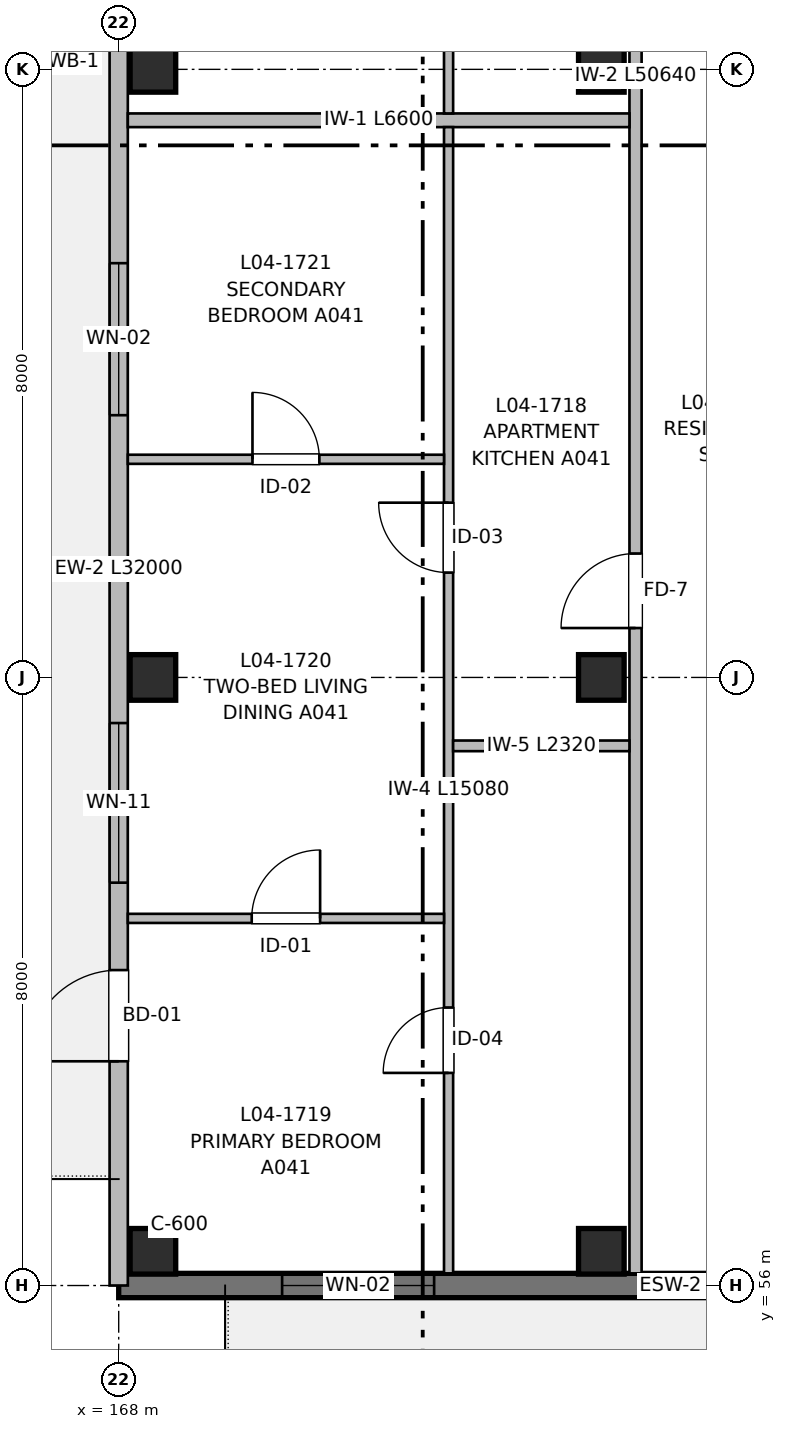
"""IFC4 building model, lengths in metres.
Left out: names, types, materials, properties, quantities, classifications, styles, units other than length and angle.
Written with IfcOpenShell. Run it as: python <this file> out.ifc"""

import sys

from ifc_helpers import new_model, si_unit, direction, frame, frame_2d, origin, origin_2d, place, context, subcontext, project, spatial, rectangle, extrude, element, fill, save


model = new_model("IFC4")
c1 = context("Model", 3, precision=1e-05, world=origin(), true_north=direction((0.0, 1.0)))
c2 = subcontext(c1, "Body", "Model", "MODEL_VIEW")
j1 = project(units=[si_unit("LENGTHUNIT", "METRE"), si_unit("PLANEANGLEUNIT", "RADIAN")], contexts=[c1])
p1 = place(None, origin())
s1 = spatial("IfcSite", under=j1, at=p1, CompositionType="ELEMENT")
p2 = place(p1, origin())
s2 = spatial("IfcBuilding", under=s1, at=p2, CompositionType="ELEMENT")
p3 = place(p2, frame((0.0, 0.0, 13.76)))
s3 = spatial("IfcBuildingStorey", under=s2, at=p3, CompositionType="ELEMENT", Elevation=13.76)
for number, where, z_axis, x_axis in (
    (1, (168.45, 56.45, 0.0), (0.0, 0.0, 1.0), (1.0, 0.0, 0.0)),
    (2, (168.45, 64.0, 0.0), (0.0, 0.0, 1.0), (1.0, 0.0, 0.0)),
    (3, (168.45, 72.0, 0.0), (0.0, 0.0, 1.0), (1.0, 0.0, 0.0)),
    (4, (174.35, 56.45, 0.0), (0.0, 0.0, 1.0), (1.0, 0.0, 0.0)),
    (5, (174.35, 64.0, 0.0), (0.0, 0.0, 1.0), (1.0, 0.0, 0.0)),
    (6, (174.35, 72.0, 0.0), (0.0, 0.0, 1.0), (1.0, 0.0, 0.0)),
):
    element("IfcColumn", number, at=place(p3, frame(where, z_axis=z_axis, x_axis=x_axis)), inside=s3, PredefinedType="COLUMN", context=c2, shape_type="SweptSolid", body=[
        extrude(rectangle(XDim=0.6, YDim=0.6, at=origin_2d()), origin(), (0.0, 0.0, 1.0), 3.2),
    ])
p4 = place(p3, frame((184.0, 56.0, 0.0), z_axis=(0.0, 0.0, 1.0), x_axis=(-1.0, 0.0, 0.0)))
e7 = element("IfcWall", 7, at=p4, inside=s3, PredefinedType="SHEAR", context=c2, shape_type="SweptSolid", body=[
    extrude(rectangle(XDim=16.0, YDim=0.32, at=frame_2d((8.0, 0.0))), origin(), (0.0, 0.0, 1.0), 2.98),
])
p5 = place(p4, frame((3.4, 0.0, 0.0)))
e8 = element("IfcOpeningElement", 8, at=p5, cuts=e7, PredefinedType="OPENING", context=c2, shape_type="SweptSolid", body=[
    extrude(rectangle(XDim=1.2, YDim=2.2, at=frame_2d((0.6, 1.1))), frame((0.0, 0.17, 0.0), z_axis=(0.0, -1.0, 0.0), x_axis=(1.0, 0.0, 0.0)), (0.0, 0.0, 1.0), 0.34),
])
p6 = place(p4, frame((11.85, 0.0, 0.72)))
e9 = element("IfcOpeningElement", 9, at=p6, cuts=e7, PredefinedType="OPENING", context=c2, shape_type="SweptSolid", body=[
    extrude(rectangle(XDim=2.0, YDim=1.5, at=frame_2d((1.0, 0.75))), frame((0.0, 0.17, 0.0), z_axis=(0.0, -1.0, 0.0), x_axis=(1.0, 0.0, 0.0)), (0.0, 0.0, 1.0), 0.34),
])
p7 = place(p3, frame((168.0, 56.0, 0.0), z_axis=(0.0, 0.0, 1.0), x_axis=(0.0, 1.0, 0.0)))
e10 = element("IfcWall", 10, at=p7, inside=s3, PredefinedType="SOLIDWALL", context=c2, shape_type="SweptSolid", body=[
    extrude(rectangle(XDim=32.0, YDim=0.24, at=frame_2d((16.0, 0.0))), origin(), (0.0, 0.0, 1.0), 2.98),
])
p8 = place(p7, frame((2.95, 0.0, 0.0)))
e11 = element("IfcOpeningElement", 11, at=p8, cuts=e10, PredefinedType="OPENING", context=c2, shape_type="SweptSolid", body=[
    extrude(rectangle(XDim=1.2, YDim=2.2, at=frame_2d((0.6, 1.1))), frame((0.0, 0.13, 0.0), z_axis=(0.0, -1.0, 0.0), x_axis=(1.0, 0.0, 0.0)), (0.0, 0.0, 1.0), 0.26),
])
p9 = place(p7, frame((5.3, 0.0, 0.67)))
e12 = element("IfcOpeningElement", 12, at=p9, cuts=e10, PredefinedType="OPENING", context=c2, shape_type="SweptSolid", body=[
    extrude(rectangle(XDim=2.1, YDim=1.55, at=frame_2d((1.05, 0.775))), frame((0.0, 0.13, 0.0), z_axis=(0.0, -1.0, 0.0), x_axis=(1.0, 0.0, 0.0)), (0.0, 0.0, 1.0), 0.26),
])
p10 = place(p7, frame((11.45, 0.0, 0.72)))
e13 = element("IfcOpeningElement", 13, at=p10, cuts=e10, PredefinedType="OPENING", context=c2, shape_type="SweptSolid", body=[
    extrude(rectangle(XDim=2.0, YDim=1.5, at=frame_2d((1.0, 0.75))), frame((0.0, 0.13, 0.0), z_axis=(0.0, -1.0, 0.0), x_axis=(1.0, 0.0, 0.0)), (0.0, 0.0, 1.0), 0.26),
])
p11 = place(p7, frame((20.025, 0.0, 0.77)))
e14 = element("IfcOpeningElement", 14, at=p11, cuts=e10, PredefinedType="OPENING", context=c2, shape_type="SweptSolid", body=[
    extrude(rectangle(XDim=1.65, YDim=1.45, at=frame_2d((0.825, 0.725))), frame((0.0, 0.13, 0.0), z_axis=(0.0, -1.0, 0.0), x_axis=(1.0, 0.0, 0.0)), (0.0, 0.0, 1.0), 0.26),
])
p12 = place(p7, frame((27.2, 0.0, 0.77)))
e15 = element("IfcOpeningElement", 15, at=p12, cuts=e10, PredefinedType="OPENING", context=c2, shape_type="SweptSolid", body=[
    extrude(rectangle(XDim=1.6, YDim=1.45, at=frame_2d((0.8, 0.725))), frame((0.0, 0.13, 0.0), z_axis=(0.0, -1.0, 0.0), x_axis=(1.0, 0.0, 0.0)), (0.0, 0.0, 1.0), 0.26),
])
p13 = place(p7, frame((16.81, 0.0, 0.82)))
e16 = element("IfcOpeningElement", 16, at=p13, cuts=e10, PredefinedType="OPENING", context=c2, shape_type="SweptSolid", body=[
    extrude(rectangle(XDim=1.5, YDim=1.4, at=frame_2d((0.75, 0.7))), frame((0.0, 0.13, 0.0), z_axis=(0.0, -1.0, 0.0), x_axis=(1.0, 0.0, 0.0)), (0.0, 0.0, 1.0), 0.26),
])
p14 = place(p7, frame((29.945, 0.0, 0.82)))
e17 = element("IfcOpeningElement", 17, at=p14, cuts=e10, PredefinedType="OPENING", context=c2, shape_type="SweptSolid", body=[
    extrude(rectangle(XDim=1.5, YDim=1.4, at=frame_2d((0.75, 0.7))), frame((0.0, 0.13, 0.0), z_axis=(0.0, -1.0, 0.0), x_axis=(1.0, 0.0, 0.0)), (0.0, 0.0, 1.0), 0.26),
])
p15 = place(p3, frame((174.8, 56.16, 0.0), z_axis=(0.0, 0.0, 1.0), x_axis=(0.0, 1.0, 0.0)))
e18 = element("IfcWall", 18, at=p15, inside=s3, PredefinedType="PARTITIONING", context=c2, shape_type="SweptSolid", body=[
    extrude(rectangle(XDim=50.64, YDim=0.16, at=frame_2d((25.32, 0.0))), origin(), (0.0, 0.0, 1.0), 2.935),
])
p16 = place(p15, frame((8.49, 0.0, 0.0)))
e19 = element("IfcOpeningElement", 19, at=p16, cuts=e18, PredefinedType="OPENING", context=c2, shape_type="SweptSolid", body=[
    extrude(rectangle(XDim=0.98, YDim=2.15, at=frame_2d((0.49, 1.075))), frame((0.0, 0.09, 0.0), z_axis=(0.0, -1.0, 0.0), x_axis=(1.0, 0.0, 0.0)), (0.0, 0.0, 1.0), 0.18),
])
p17 = place(p15, frame((22.04, 0.0, 0.0)))
e20 = element("IfcOpeningElement", 20, at=p17, cuts=e18, PredefinedType="OPENING", context=c2, shape_type="SweptSolid", body=[
    extrude(rectangle(XDim=0.98, YDim=2.15, at=frame_2d((0.49, 1.075))), frame((0.0, 0.09, 0.0), z_axis=(0.0, -1.0, 0.0), x_axis=(1.0, 0.0, 0.0)), (0.0, 0.0, 1.0), 0.18),
])
p18 = place(p15, frame((35.66, 0.0, 0.0)))
e21 = element("IfcOpeningElement", 21, at=p18, cuts=e18, PredefinedType="OPENING", context=c2, shape_type="SweptSolid", body=[
    extrude(rectangle(XDim=0.98, YDim=2.15, at=frame_2d((0.49, 1.075))), frame((0.0, 0.09, 0.0), z_axis=(0.0, -1.0, 0.0), x_axis=(1.0, 0.0, 0.0)), (0.0, 0.0, 1.0), 0.18),
])
p19 = place(p15, frame((46.44, 0.0, 0.0)))
e22 = element("IfcOpeningElement", 22, at=p19, cuts=e18, PredefinedType="OPENING", context=c2, shape_type="SweptSolid", body=[
    extrude(rectangle(XDim=0.98, YDim=2.15, at=frame_2d((0.49, 1.075))), frame((0.0, 0.09, 0.0), z_axis=(0.0, -1.0, 0.0), x_axis=(1.0, 0.0, 0.0)), (0.0, 0.0, 1.0), 0.18),
])
p20 = place(p3, frame((168.12, 71.33, 0.0), z_axis=(0.0, 0.0, 1.0), x_axis=(1.0, 0.0, 0.0)))
e23 = element("IfcWall", 23, at=p20, inside=s3, PredefinedType="PARTITIONING", context=c2, shape_type="SweptSolid", body=[
    extrude(rectangle(XDim=6.6, YDim=0.18, at=frame_2d((3.3, 0.0))), origin(), (0.0, 0.0, 1.0), 2.935),
])
p21 = place(p3, frame((172.34, 56.16, 0.0), z_axis=(0.0, 0.0, 1.0), x_axis=(0.0, 1.0, 0.0)))
e24 = element("IfcWall", 24, at=p21, inside=s3, PredefinedType="PARTITIONING", context=c2, shape_type="SweptSolid", body=[
    extrude(rectangle(XDim=15.08, YDim=0.12, at=frame_2d((7.54, 0.0))), origin(), (0.0, 0.0, 1.0), 2.935),
])
p22 = place(p21, frame((2.637, 0.0, 0.0)))
e25 = element("IfcOpeningElement", 25, at=p22, cuts=e24, PredefinedType="OPENING", context=c2, shape_type="SweptSolid", body=[
    extrude(rectangle(XDim=0.86, YDim=2.1, at=frame_2d((0.43, 1.05))), frame((0.0, 0.07, 0.0), z_axis=(0.0, -1.0, 0.0), x_axis=(1.0, 0.0, 0.0)), (0.0, 0.0, 1.0), 0.14),
])
p23 = place(p21, frame((9.219, 0.0, 0.0)))
e26 = element("IfcOpeningElement", 26, at=p23, cuts=e24, PredefinedType="OPENING", context=c2, shape_type="SweptSolid", body=[
    extrude(rectangle(XDim=0.92, YDim=2.1, at=frame_2d((0.46, 1.05))), frame((0.0, 0.07, 0.0), z_axis=(0.0, -1.0, 0.0), x_axis=(1.0, 0.0, 0.0)), (0.0, 0.0, 1.0), 0.14),
])
p24 = place(p3, frame((172.4, 63.1, 0.0), z_axis=(0.0, 0.0, 1.0), x_axis=(1.0, 0.0, 0.0)))
e27 = element("IfcWall", 27, at=p24, inside=s3, PredefinedType="PARTITIONING", context=c2, shape_type="SweptSolid", body=[
    extrude(rectangle(XDim=2.32, YDim=0.14, at=frame_2d((1.16, 0.0))), origin(), (0.0, 0.0, 1.0), 2.935),
])
p25 = place(p3, frame((168.12, 60.83, 0.0), z_axis=(0.0, 0.0, 1.0), x_axis=(1.0, 0.0, 0.0)))
e28 = element("IfcWall", 28, at=p25, inside=s3, PredefinedType="PARTITIONING", context=c2, shape_type="SweptSolid", body=[
    extrude(rectangle(XDim=4.16, YDim=0.12, at=frame_2d((2.08, 0.0))), origin(), (0.0, 0.0, 1.0), 2.935),
])
p26 = place(p25, frame((1.63, 0.0, 0.0)))
e29 = element("IfcOpeningElement", 29, at=p26, cuts=e28, PredefinedType="OPENING", context=c2, shape_type="SweptSolid", body=[
    extrude(rectangle(XDim=0.9, YDim=2.1, at=frame_2d((0.45, 1.05))), frame((0.0, 0.07, 0.0), z_axis=(0.0, -1.0, 0.0), x_axis=(1.0, 0.0, 0.0)), (0.0, 0.0, 1.0), 0.14),
])
p27 = place(p3, frame((168.12, 66.87, 0.0), z_axis=(0.0, 0.0, 1.0), x_axis=(1.0, 0.0, 0.0)))
e30 = element("IfcWall", 30, at=p27, inside=s3, PredefinedType="PARTITIONING", context=c2, shape_type="SweptSolid", body=[
    extrude(rectangle(XDim=4.16, YDim=0.12, at=frame_2d((2.08, 0.0))), origin(), (0.0, 0.0, 1.0), 2.935),
])
p28 = place(p27, frame((1.64, 0.0, 0.0)))
e31 = element("IfcOpeningElement", 31, at=p28, cuts=e30, PredefinedType="OPENING", context=c2, shape_type="SweptSolid", body=[
    extrude(rectangle(XDim=0.88, YDim=2.1, at=frame_2d((0.44, 1.05))), frame((0.0, 0.07, 0.0), z_axis=(0.0, -1.0, 0.0), x_axis=(1.0, 0.0, 0.0)), (0.0, 0.0, 1.0), 0.14),
])
p29 = place(p3, frame((172.34, 71.42, 0.0), z_axis=(0.0, 0.0, 1.0), x_axis=(0.0, 1.0, 0.0)))
e32 = element("IfcWall", 32, at=p29, inside=s3, PredefinedType="PARTITIONING", context=c2, shape_type="SweptSolid", body=[
    extrude(rectangle(XDim=13.97, YDim=0.12, at=frame_2d((6.985, 0.0))), origin(), (0.0, 0.0, 1.0), 2.935),
])
p30 = place(p29, frame((2.443, 0.0, 0.0)))
e33 = element("IfcOpeningElement", 33, at=p30, cuts=e32, PredefinedType="OPENING", context=c2, shape_type="SweptSolid", body=[
    extrude(rectangle(XDim=0.86, YDim=2.1, at=frame_2d((0.43, 1.05))), frame((0.0, 0.07, 0.0), z_axis=(0.0, -1.0, 0.0), x_axis=(1.0, 0.0, 0.0)), (0.0, 0.0, 1.0), 0.14),
])
p31 = place(p29, frame((8.541, 0.0, 0.0)))
e34 = element("IfcOpeningElement", 34, at=p31, cuts=e32, PredefinedType="OPENING", context=c2, shape_type="SweptSolid", body=[
    extrude(rectangle(XDim=0.92, YDim=2.1, at=frame_2d((0.46, 1.05))), frame((0.0, 0.07, 0.0), z_axis=(0.0, -1.0, 0.0), x_axis=(1.0, 0.0, 0.0)), (0.0, 0.0, 1.0), 0.14),
])
p32 = place(p6, origin())
e35 = element("IfcWindow", 35, at=p32, inside=s3, PartitioningType="SINGLE_PANEL", PredefinedType="WINDOW", context=c2, shape_type="SweptSolid", body=[
    extrude(rectangle(XDim=2.0, YDim=1.5, at=frame_2d((1.0, 0.75))), frame((0.0, 0.03, 0.0), z_axis=(0.0, -1.0, 0.0), x_axis=(1.0, 0.0, 0.0)), (0.0, 0.0, 1.0), 0.06),
])
fill(e9, e35)
p33 = place(p8, origin())
e36 = element("IfcDoor", 36, at=p33, inside=s3, OperationType="SINGLE_SWING_LEFT", PredefinedType="DOOR", context=c2, shape_type="SweptSolid", body=[
    extrude(rectangle(XDim=1.2, YDim=2.2, at=frame_2d((0.6, 1.1))), frame((0.0, 0.025, 0.0), z_axis=(0.0, -1.0, 0.0), x_axis=(1.0, 0.0, 0.0)), (0.0, 0.0, 1.0), 0.05),
])
fill(e11, e36)
p34 = place(p9, origin())
e37 = element("IfcWindow", 37, at=p34, inside=s3, PartitioningType="SINGLE_PANEL", PredefinedType="WINDOW", context=c2, shape_type="SweptSolid", body=[
    extrude(rectangle(XDim=2.1, YDim=1.55, at=frame_2d((1.05, 0.775))), frame((0.0, 0.03, 0.0), z_axis=(0.0, -1.0, 0.0), x_axis=(1.0, 0.0, 0.0)), (0.0, 0.0, 1.0), 0.06),
])
fill(e12, e37)
p35 = place(p10, origin())
e38 = element("IfcWindow", 38, at=p35, inside=s3, PartitioningType="SINGLE_PANEL", PredefinedType="WINDOW", context=c2, shape_type="SweptSolid", body=[
    extrude(rectangle(XDim=2.0, YDim=1.5, at=frame_2d((1.0, 0.75))), frame((0.0, 0.03, 0.0), z_axis=(0.0, -1.0, 0.0), x_axis=(1.0, 0.0, 0.0)), (0.0, 0.0, 1.0), 0.06),
])
fill(e13, e38)
p36 = place(p22, origin())
e39 = element("IfcDoor", 39, at=p36, inside=s3, OperationType="SINGLE_SWING_LEFT", PredefinedType="DOOR", context=c2, shape_type="SweptSolid", body=[
    extrude(rectangle(XDim=0.86, YDim=2.1, at=frame_2d((0.43, 1.05))), frame((0.0, 0.025, 0.0), z_axis=(0.0, -1.0, 0.0), x_axis=(1.0, 0.0, 0.0)), (0.0, 0.0, 1.0), 0.05),
])
fill(e25, e39)
p37 = place(p23, origin())
e40 = element("IfcDoor", 40, at=p37, inside=s3, OperationType="SINGLE_SWING_RIGHT", PredefinedType="DOOR", context=c2, shape_type="SweptSolid", body=[
    extrude(rectangle(XDim=0.92, YDim=2.1, at=frame_2d((0.46, 1.05))), frame((0.0, 0.025, 0.0), z_axis=(0.0, -1.0, 0.0), x_axis=(1.0, 0.0, 0.0)), (0.0, 0.0, 1.0), 0.05),
])
fill(e26, e40)
p38 = place(p16, origin())
e41 = element("IfcDoor", 41, at=p38, inside=s3, OperationType="SINGLE_SWING_LEFT", PredefinedType="DOOR", context=c2, shape_type="SweptSolid", body=[
    extrude(rectangle(XDim=0.98, YDim=2.15, at=frame_2d((0.49, 1.075))), frame((0.0, 0.025, 0.0), z_axis=(0.0, -1.0, 0.0), x_axis=(1.0, 0.0, 0.0)), (0.0, 0.0, 1.0), 0.05),
])
fill(e19, e41)
p39 = place(p26, origin())
e42 = element("IfcDoor", 42, at=p39, inside=s3, OperationType="SINGLE_SWING_RIGHT", PredefinedType="DOOR", context=c2, shape_type="SweptSolid", body=[
    extrude(rectangle(XDim=0.9, YDim=2.1, at=frame_2d((0.45, 1.05))), frame((0.0, 0.025, 0.0), z_axis=(0.0, -1.0, 0.0), x_axis=(1.0, 0.0, 0.0)), (0.0, 0.0, 1.0), 0.05),
])
fill(e29, e42)
p40 = place(p28, origin())
e43 = element("IfcDoor", 43, at=p40, inside=s3, OperationType="SINGLE_SWING_LEFT", PredefinedType="DOOR", context=c2, shape_type="SweptSolid", body=[
    extrude(rectangle(XDim=0.88, YDim=2.1, at=frame_2d((0.44, 1.05))), frame((0.0, 0.025, 0.0), z_axis=(0.0, -1.0, 0.0), x_axis=(1.0, 0.0, 0.0)), (0.0, 0.0, 1.0), 0.05),
])
fill(e31, e43)
save(model, sys.argv[1])
